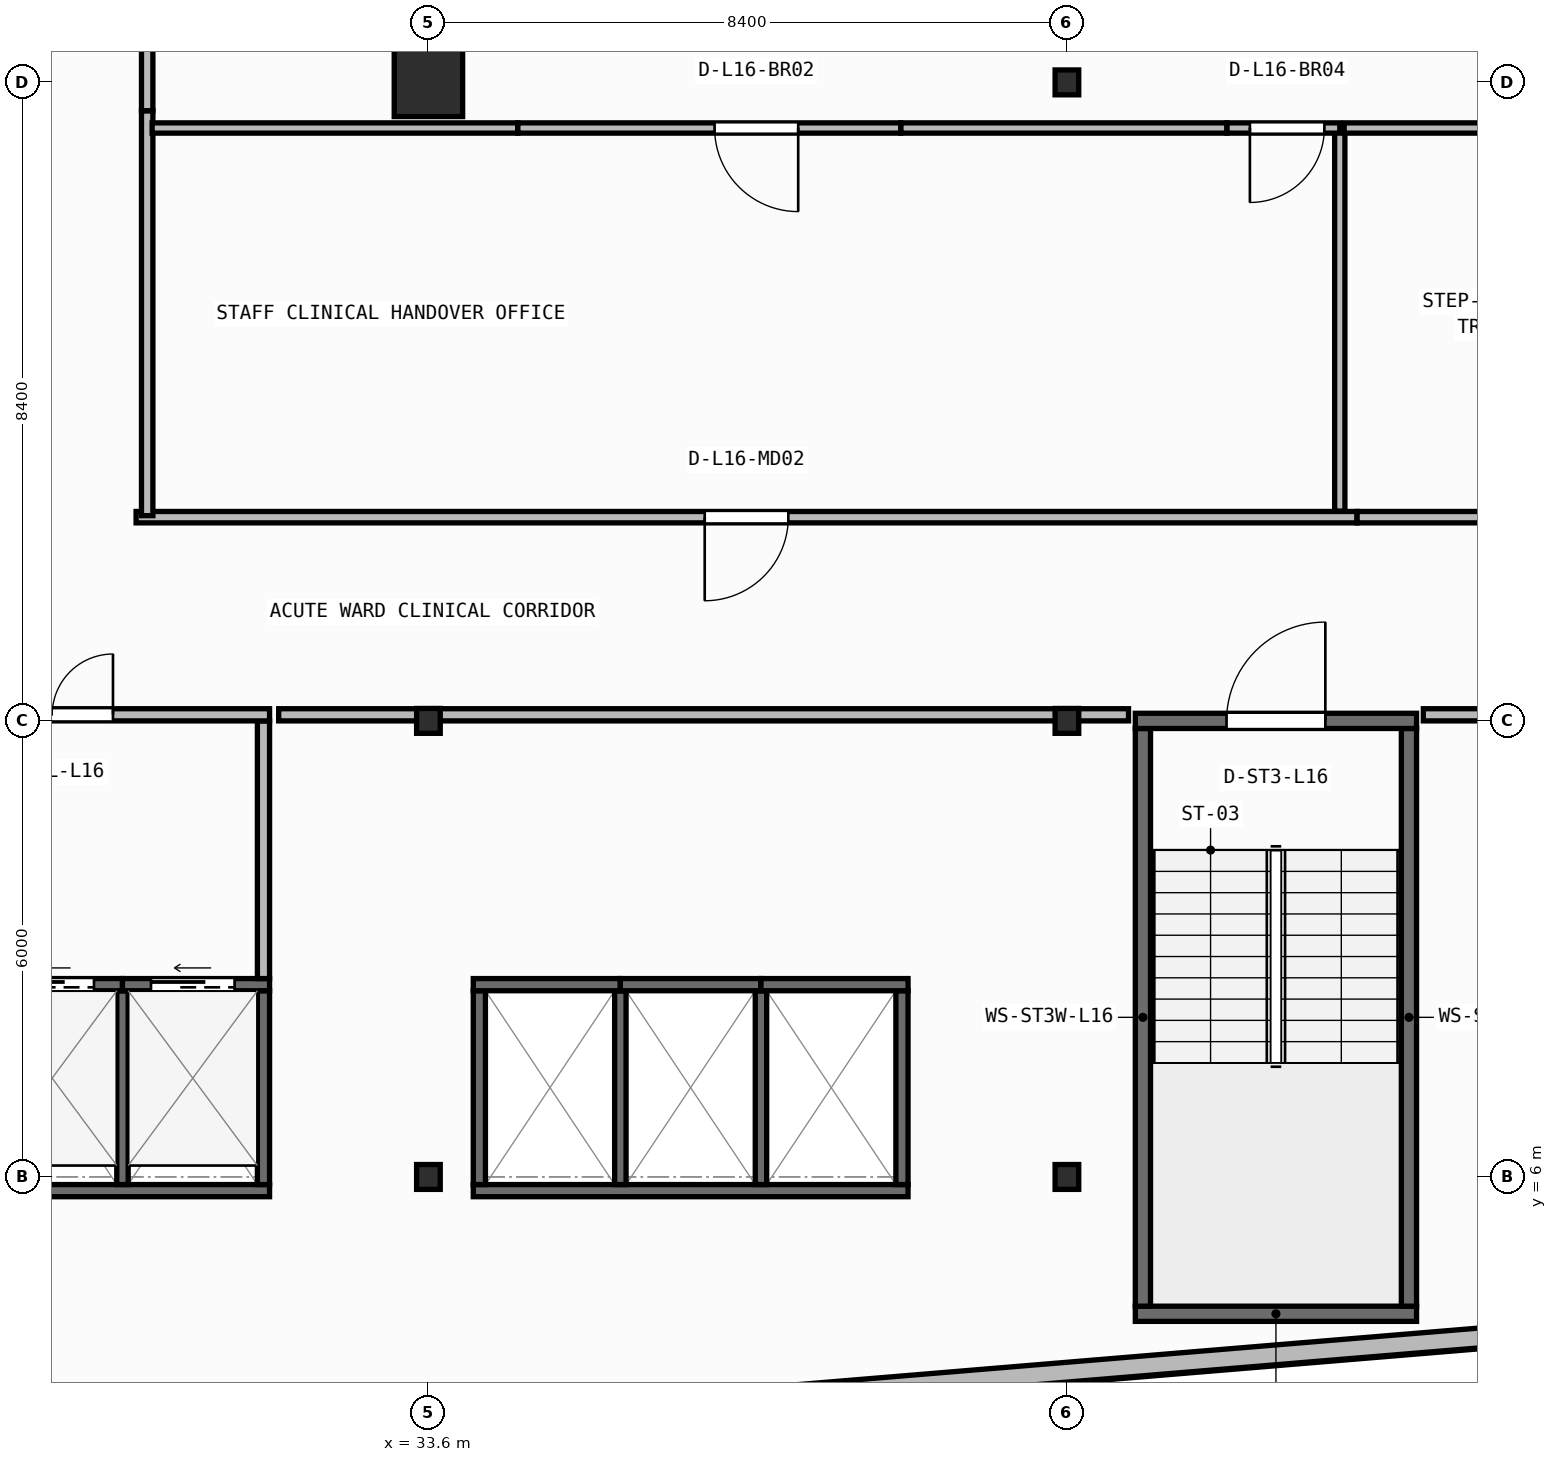
"""IFC4 building model, lengths in metres.
Left out: names, types, materials, properties, quantities, classifications, styles, units other than length and angle.
Written with IfcOpenShell. Run it as: python <this file> out.ifc"""

import sys

from ifc_helpers import new_model, si_unit, direction, frame, frame_2d, origin, origin_2d, place, context, subcontext, project, spatial, rectangle, i_section, extrude, element, fill, save


model = new_model("IFC4")
c1 = context("Model", 3, precision=1e-05, world=origin(), true_north=direction((0.0, 1.0)))
c2 = subcontext(c1, "Body", "Model", "MODEL_VIEW")
j1 = project(units=[si_unit("LENGTHUNIT", "METRE"), si_unit("PLANEANGLEUNIT", "RADIAN")], contexts=[c1])
p1 = place(None, origin())
s1 = spatial("IfcSite", under=j1, at=p1, CompositionType="ELEMENT")
p2 = place(p1, origin())
s2 = spatial("IfcBuilding", under=s1, at=p2, CompositionType="ELEMENT")
p3 = place(p2, frame((0.0, 0.0, 65.95)))
s3 = spatial("IfcBuildingStorey", under=s2, at=p3, CompositionType="ELEMENT", Elevation=65.95)
for number, where, z_axis, x_axis in (
    (1, (33.6, 6.0, 0.0), (0.0, 0.0, 1.0), (1.0, 0.0, 0.0)),
    (2, (42.0, 6.0, 0.0), (0.0, 0.0, 1.0), (1.0, 0.0, 0.0)),
    (3, (33.6, 12.0, 0.0), (0.0, 0.0, 1.0), (1.0, 0.0, 0.0)),
    (4, (42.0, 12.0, 0.0), (0.0, 0.0, 1.0), (1.0, 0.0, 0.0)),
):
    element("IfcColumn", number, at=place(p3, frame(where, z_axis=z_axis, x_axis=x_axis)), inside=s3, PredefinedType="COLUMN", context=c2, shape_type="SweptSolid", body=[
        extrude(i_section(OverallWidth=0.311, OverallDepth=0.327, WebThickness=0.016, FlangeThickness=0.025, FilletRadius=0.017, at=origin_2d()), origin(), (0.0, 0.0, 1.0), 3.95),
    ])
p4 = place(p3, frame((33.6, 20.4, 0.0), z_axis=(0.0, 0.0, 1.0), x_axis=(1.0, 0.0, 0.0)))
e5 = element("IfcColumn", 5, at=p4, inside=s3, PredefinedType="COLUMN", context=c2, shape_type="SweptSolid", body=[
    extrude(rectangle(XDim=0.9, YDim=0.9, at=origin_2d()), origin(), (0.0, 0.0, 1.0), 3.95),
])
p5 = place(p3, frame((42.0, 20.4, 0.0), z_axis=(0.0, 0.0, 1.0), x_axis=(1.0, 0.0, 0.0)))
e6 = element("IfcColumn", 6, at=p5, inside=s3, PredefinedType="COLUMN", context=c2, shape_type="SweptSolid", body=[
    extrude(i_section(OverallWidth=0.311, OverallDepth=0.327, WebThickness=0.016, FlangeThickness=0.025, FilletRadius=0.017, at=origin_2d()), origin(), (0.0, 0.0, 1.0), 3.95),
])
p6 = place(p3, frame((2.76, 0.174, 0.0), z_axis=(0.0, 0.0, 1.0), x_axis=(0.996571478456, 0.082736257641, 0.0)))
e7 = element("IfcWall", 7, at=p6, inside=s3, PredefinedType="STANDARD", context=c2, shape_type="SweptSolid", body=[
    extrude(rectangle(XDim=52.861, YDim=0.26, at=frame_2d((26.431, 0.0))), origin(), (0.0, 0.0, 1.0), 3.71),
])
p7 = place(p6, frame((25.231, 0.0, 0.9)))
e8 = element("IfcOpeningElement", 8, at=p7, cuts=e7, PredefinedType="OPENING", context=c2, shape_type="SweptSolid", body=[
    extrude(rectangle(XDim=2.4, YDim=1.65, at=frame_2d((1.2, 0.825))), frame((0.0, 0.14, 0.0), z_axis=(0.0, -1.0, 0.0), x_axis=(1.0, 0.0, 0.0)), (0.0, 0.0, 1.0), 0.28),
])
p8 = place(p3, frame((42.9, 4.2, 0.0), z_axis=(0.0, 0.0, 1.0), x_axis=(1.0, 0.0, 0.0)))
e9 = element("IfcWall", 9, at=p8, inside=s3, PredefinedType="SHEAR", context=c2, shape_type="SweptSolid", body=[
    extrude(rectangle(XDim=3.7, YDim=0.2, at=frame_2d((1.85, 0.0))), origin(), (0.0, 0.0, 1.0), 3.71),
])
for number, where, z_axis, x_axis in (
    (10, (43.0, 4.3, 0.0), (0.0, 0.0, 1.0), (0.0, 1.0, 0.0)),
    (11, (46.5, 4.3, 0.0), (0.0, 0.0, 1.0), (0.0, 1.0, 0.0)),
):
    element("IfcWall", number, at=place(p3, frame(where, z_axis=z_axis, x_axis=x_axis)), inside=s3, PredefinedType="SHEAR", context=c2, shape_type="SweptSolid", body=[
        extrude(rectangle(XDim=7.6, YDim=0.2, at=frame_2d((3.8, 0.0))), origin(), (0.0, 0.0, 1.0), 3.71),
    ])
p9 = place(p3, frame((42.9, 12.0, 0.0), z_axis=(0.0, 0.0, 1.0), x_axis=(1.0, 0.0, 0.0)))
e12 = element("IfcWall", 12, at=p9, inside=s3, PredefinedType="SHEAR", context=c2, shape_type="SweptSolid", body=[
    extrude(rectangle(XDim=3.7, YDim=0.2, at=frame_2d((1.85, 0.0))), origin(), (0.0, 0.0, 1.0), 3.71),
])
p10 = place(p9, frame((1.2, 0.0, 0.0)))
e13 = element("IfcOpeningElement", 13, at=p10, cuts=e12, PredefinedType="OPENING", context=c2, shape_type="SweptSolid", body=[
    extrude(rectangle(XDim=1.3, YDim=2.15, at=frame_2d((0.65, 1.075))), frame((0.0, 0.11, 0.0), z_axis=(0.0, -1.0, 0.0), x_axis=(1.0, 0.0, 0.0)), (0.0, 0.0, 1.0), 0.22),
])
p11 = place(p3, frame((25.79, 5.82, 0.0), z_axis=(0.0, 0.0, 1.0), x_axis=(1.0, 0.0, 0.0)))
e14 = element("IfcWall", 14, at=p11, inside=s3, PredefinedType="SHEAR", context=c2, shape_type="SweptSolid", body=[
    extrude(rectangle(XDim=5.72, YDim=0.16, at=frame_2d((2.86, 0.0))), origin(), (0.0, 0.0, 1.0), 3.71),
])
p12 = place(p3, frame((31.43, 5.9, 0.0), z_axis=(0.0, 0.0, 1.0), x_axis=(0.0, 1.0, 0.0)))
e15 = element("IfcWall", 15, at=p12, inside=s3, PredefinedType="SHEAR", context=c2, shape_type="SweptSolid", body=[
    extrude(rectangle(XDim=2.55, YDim=0.16, at=frame_2d((1.275, 0.0))), origin(), (0.0, 0.0, 1.0), 3.71),
])
p13 = place(p3, frame((29.575, 5.9, 0.0), z_axis=(0.0, 0.0, 1.0), x_axis=(0.0, 1.0, 0.0)))
e16 = element("IfcWall", 16, at=p13, inside=s3, PredefinedType="SHEAR", context=c2, shape_type="SweptSolid", body=[
    extrude(rectangle(XDim=2.55, YDim=0.15, at=frame_2d((1.275, 0.0))), origin(), (0.0, 0.0, 1.0), 3.71),
])
p14 = place(p3, frame((27.725, 8.53, 0.0), z_axis=(0.0, 0.0, 1.0), x_axis=(1.0, 0.0, 0.0)))
e17 = element("IfcWall", 17, at=p14, inside=s3, PredefinedType="SHEAR", context=c2, shape_type="SweptSolid", body=[
    extrude(rectangle(XDim=1.85, YDim=0.16, at=frame_2d((0.925, 0.0))), origin(), (0.0, 0.0, 1.0), 3.71),
])
p15 = place(p14, frame((0.375, 0.0, 0.0)))
e18 = element("IfcOpeningElement", 18, at=p15, cuts=e17, PredefinedType="OPENING", context=c2, shape_type="SweptSolid", body=[
    extrude(rectangle(XDim=1.1, YDim=2.15, at=frame_2d((0.55, 1.075))), frame((0.0, 0.09, 0.0), z_axis=(0.0, -1.0, 0.0), x_axis=(1.0, 0.0, 0.0)), (0.0, 0.0, 1.0), 0.18),
])
p16 = place(p3, frame((29.575, 8.53, 0.0), z_axis=(0.0, 0.0, 1.0), x_axis=(1.0, 0.0, 0.0)))
e19 = element("IfcWall", 19, at=p16, inside=s3, PredefinedType="SHEAR", context=c2, shape_type="SweptSolid", body=[
    extrude(rectangle(XDim=1.935, YDim=0.16, at=frame_2d((0.968, 0.0))), origin(), (0.0, 0.0, 1.0), 3.71),
])
p17 = place(p16, frame((0.375, 0.0, 0.0)))
e20 = element("IfcOpeningElement", 20, at=p17, cuts=e19, PredefinedType="OPENING", context=c2, shape_type="SweptSolid", body=[
    extrude(rectangle(XDim=1.1, YDim=2.15, at=frame_2d((0.55, 1.075))), frame((0.0, 0.09, 0.0), z_axis=(0.0, -1.0, 0.0), x_axis=(1.0, 0.0, 0.0)), (0.0, 0.0, 1.0), 0.18),
])
p18 = place(p3, frame((34.19, 5.82, 0.0), z_axis=(0.0, 0.0, 1.0), x_axis=(1.0, 0.0, 0.0)))
e21 = element("IfcWall", 21, at=p18, inside=s3, PredefinedType="SHEAR", context=c2, shape_type="SweptSolid", body=[
    extrude(rectangle(XDim=5.72, YDim=0.16, at=frame_2d((2.86, 0.0))), origin(), (0.0, 0.0, 1.0), 3.71),
])
for number, where, z_axis, x_axis in (
    (22, (34.27, 5.9, 0.0), (0.0, 0.0, 1.0), (0.0, 1.0, 0.0)),
    (23, (39.83, 5.9, 0.0), (0.0, 0.0, 1.0), (0.0, 1.0, 0.0)),
):
    element("IfcWall", number, at=place(p3, frame(where, z_axis=z_axis, x_axis=x_axis)), inside=s3, PredefinedType="SHEAR", context=c2, shape_type="SweptSolid", body=[
        extrude(rectangle(XDim=2.55, YDim=0.16, at=frame_2d((1.275, 0.0))), origin(), (0.0, 0.0, 1.0), 3.71),
    ])
for number, where, z_axis, x_axis in (
    (24, (36.125, 5.9, 0.0), (0.0, 0.0, 1.0), (0.0, 1.0, 0.0)),
    (25, (37.975, 5.9, 0.0), (0.0, 0.0, 1.0), (0.0, 1.0, 0.0)),
):
    element("IfcWall", number, at=place(p3, frame(where, z_axis=z_axis, x_axis=x_axis)), inside=s3, PredefinedType="SHEAR", context=c2, shape_type="SweptSolid", body=[
        extrude(rectangle(XDim=2.55, YDim=0.15, at=frame_2d((1.275, 0.0))), origin(), (0.0, 0.0, 1.0), 3.71),
    ])
p19 = place(p3, frame((34.19, 8.53, 0.0), z_axis=(0.0, 0.0, 1.0), x_axis=(1.0, 0.0, 0.0)))
e26 = element("IfcWall", 26, at=p19, inside=s3, PredefinedType="SHEAR", context=c2, shape_type="SweptSolid", body=[
    extrude(rectangle(XDim=1.935, YDim=0.16, at=frame_2d((0.968, 0.0))), origin(), (0.0, 0.0, 1.0), 3.71),
])
p20 = place(p3, frame((36.125, 8.53, 0.0), z_axis=(0.0, 0.0, 1.0), x_axis=(1.0, 0.0, 0.0)))
e27 = element("IfcWall", 27, at=p20, inside=s3, PredefinedType="SHEAR", context=c2, shape_type="SweptSolid", body=[
    extrude(rectangle(XDim=1.85, YDim=0.16, at=frame_2d((0.925, 0.0))), origin(), (0.0, 0.0, 1.0), 3.71),
])
p21 = place(p3, frame((37.975, 8.53, 0.0), z_axis=(0.0, 0.0, 1.0), x_axis=(1.0, 0.0, 0.0)))
e28 = element("IfcWall", 28, at=p21, inside=s3, PredefinedType="SHEAR", context=c2, shape_type="SweptSolid", body=[
    extrude(rectangle(XDim=1.935, YDim=0.16, at=frame_2d((0.967, 0.0))), origin(), (0.0, 0.0, 1.0), 3.71),
])
p22 = place(p3, frame((31.43, 8.61, 0.0), z_axis=(0.0, 0.0, 1.0), x_axis=(0.0, 1.0, 0.0)))
e29 = element("IfcWall", 29, at=p22, inside=s3, PredefinedType="PARTITIONING", context=c2, shape_type="SweptSolid", body=[
    extrude(rectangle(XDim=3.39, YDim=0.16, at=frame_2d((1.695, 0.0))), origin(), (0.0, 0.0, 1.0), 3.71),
])
p23 = place(p3, frame((25.79, 12.08, 0.0), z_axis=(0.0, 0.0, 1.0), x_axis=(1.0, 0.0, 0.0)))
e30 = element("IfcWall", 30, at=p23, inside=s3, PredefinedType="PARTITIONING", context=c2, shape_type="SweptSolid", body=[
    extrude(rectangle(XDim=5.72, YDim=0.16, at=frame_2d((2.86, 0.0))), origin(), (0.0, 0.0, 1.0), 3.073),
])
p24 = place(p23, frame((2.06, 0.0, 0.0)))
e31 = element("IfcOpeningElement", 31, at=p24, cuts=e30, PredefinedType="OPENING", context=c2, shape_type="SweptSolid", body=[
    extrude(rectangle(XDim=1.6, YDim=2.05, at=frame_2d((0.8, 1.025))), frame((0.0, 0.09, 0.0), z_axis=(0.0, -1.0, 0.0), x_axis=(1.0, 0.0, 0.0)), (0.0, 0.0, 1.0), 0.18),
])
p25 = place(p3, frame((45.816, 14.68, 0.0), z_axis=(0.0, 0.0, 1.0), x_axis=(-1.0, 0.0, 0.0)))
e32 = element("IfcWall", 32, at=p25, inside=s3, PredefinedType="PARTITIONING", context=c2, shape_type="SweptSolid", body=[
    extrude(rectangle(XDim=16.062, YDim=0.15, at=frame_2d((8.031, 0.0))), origin(), (0.0, 0.0, 1.0), 3.71),
])
p26 = place(p25, frame((7.481, 0.0, 0.0)))
e33 = element("IfcOpeningElement", 33, at=p26, cuts=e32, PredefinedType="OPENING", context=c2, shape_type="SweptSolid", body=[
    extrude(rectangle(XDim=1.1, YDim=2.1, at=frame_2d((0.55, 1.05))), frame((0.0, 0.085, 0.0), z_axis=(0.0, -1.0, 0.0), x_axis=(1.0, 0.0, 0.0)), (0.0, 0.0, 1.0), 0.17),
])
p27 = place(p3, frame((58.04, 14.68, 0.0), z_axis=(0.0, 0.0, 1.0), x_axis=(-1.0, 0.0, 0.0)))
e34 = element("IfcWall", 34, at=p27, inside=s3, PredefinedType="PARTITIONING", context=c2, shape_type="SweptSolid", body=[
    extrude(rectangle(XDim=12.222, YDim=0.15, at=frame_2d((6.111, 0.0))), origin(), (0.0, 0.0, 1.0), 3.71),
])
p28 = place(p27, frame((5.561, 0.0, 0.0)))
e35 = element("IfcOpeningElement", 35, at=p28, cuts=e34, PredefinedType="OPENING", context=c2, shape_type="SweptSolid", body=[
    extrude(rectangle(XDim=1.1, YDim=2.1, at=frame_2d((0.55, 1.05))), frame((0.0, 0.085, 0.0), z_axis=(0.0, -1.0, 0.0), x_axis=(1.0, 0.0, 0.0)), (0.0, 0.0, 1.0), 0.17),
])
p29 = place(p3, frame((29.9, 14.7, 0.0), z_axis=(0.0, 0.0, 1.0), x_axis=(0.0, 1.0, 0.0)))
e36 = element("IfcWall", 36, at=p29, inside=s3, PredefinedType="PARTITIONING", context=c2, shape_type="SweptSolid", body=[
    extrude(rectangle(XDim=5.326, YDim=0.15, at=frame_2d((2.663, 0.0))), origin(), (0.0, 0.0, 1.0), 3.71),
])
p30 = place(p3, frame((29.9, 20.028, 0.0), z_axis=(0.0, 0.0, 1.0), x_axis=(0.0, 1.0, 0.0)))
e37 = element("IfcWall", 37, at=p30, inside=s3, PredefinedType="PARTITIONING", context=c2, shape_type="SweptSolid", body=[
    extrude(rectangle(XDim=4.518, YDim=0.15, at=frame_2d((2.259, 0.0))), origin(), (0.0, 0.0, 1.0), 3.71),
])
p31 = place(p30, frame((1.709, 0.0, 0.0)))
e38 = element("IfcOpeningElement", 38, at=p31, cuts=e37, PredefinedType="OPENING", context=c2, shape_type="SweptSolid", body=[
    extrude(rectangle(XDim=1.1, YDim=2.1, at=frame_2d((0.55, 1.05))), frame((0.0, 0.085, 0.0), z_axis=(0.0, -1.0, 0.0), x_axis=(1.0, 0.0, 0.0)), (0.0, 0.0, 1.0), 0.17),
])
p32 = place(p3, frame((45.59, 14.76, 0.0), z_axis=(0.0, 0.0, 1.0), x_axis=(0.0, 1.0, 0.0)))
e39 = element("IfcWall", 39, at=p32, inside=s3, PredefinedType="PARTITIONING", context=c2, shape_type="SweptSolid", body=[
    extrude(rectangle(XDim=5.04, YDim=0.135, at=frame_2d((2.52, 0.0))), origin(), (0.0, 0.0, 1.0), 3.71),
])
p33 = place(p3, frame((34.775, 19.8, 0.0), z_axis=(0.0, 0.0, 1.0), x_axis=(-1.0, 0.0, 0.0)))
e40 = element("IfcWall", 40, at=p33, inside=s3, PredefinedType="PARTITIONING", context=c2, shape_type="SweptSolid", body=[
    extrude(rectangle(XDim=4.81, YDim=0.135, at=frame_2d((2.405, 0.0))), origin(), (0.0, 0.0, 1.0), 3.71),
])
p34 = place(p3, frame((39.815, 19.8, 0.0), z_axis=(0.0, 0.0, 1.0), x_axis=(-1.0, 0.0, 0.0)))
e41 = element("IfcWall", 41, at=p34, inside=s3, PredefinedType="PARTITIONING", context=c2, shape_type="SweptSolid", body=[
    extrude(rectangle(XDim=5.038, YDim=0.135, at=frame_2d((2.519, 0.0))), origin(), (0.0, 0.0, 1.0), 3.71),
])
p35 = place(p34, frame((1.35, 0.0, 0.0)))
e42 = element("IfcOpeningElement", 42, at=p35, cuts=e41, PredefinedType="OPENING", context=c2, shape_type="SweptSolid", body=[
    extrude(rectangle(XDim=1.1, YDim=2.1, at=frame_2d((0.55, 1.05))), frame((0.0, 0.077, 0.0), z_axis=(0.0, -1.0, 0.0), x_axis=(1.0, 0.0, 0.0)), (0.0, 0.0, 1.0), 0.155),
])
p36 = place(p3, frame((44.104, 19.8, 0.0), z_axis=(0.0, 0.0, 1.0), x_axis=(-1.0, 0.0, 0.0)))
e43 = element("IfcWall", 43, at=p36, inside=s3, PredefinedType="PARTITIONING", context=c2, shape_type="SweptSolid", body=[
    extrude(rectangle(XDim=4.288, YDim=0.135, at=frame_2d((2.144, 0.0))), origin(), (0.0, 0.0, 1.0), 3.71),
])
p37 = place(p3, frame((45.59, 19.8, 0.0), z_axis=(0.0, 0.0, 1.0), x_axis=(-1.0, 0.0, 0.0)))
e44 = element("IfcWall", 44, at=p37, inside=s3, PredefinedType="PARTITIONING", context=c2, shape_type="SweptSolid", body=[
    extrude(rectangle(XDim=1.483, YDim=0.135, at=frame_2d((0.742, 0.0))), origin(), (0.0, 0.0, 1.0), 3.71),
])
p38 = place(p37, frame((0.203, 0.0, 0.0)))
e45 = element("IfcOpeningElement", 45, at=p38, cuts=e44, PredefinedType="OPENING", context=c2, shape_type="SweptSolid", body=[
    extrude(rectangle(XDim=0.98, YDim=2.1, at=frame_2d((0.49, 1.05))), frame((0.0, 0.077, 0.0), z_axis=(0.0, -1.0, 0.0), x_axis=(1.0, 0.0, 0.0)), (0.0, 0.0, 1.0), 0.155),
])
p39 = place(p3, frame((48.765, 19.8, 0.0), z_axis=(0.0, 0.0, 1.0), x_axis=(-1.0, 0.0, 0.0)))
e46 = element("IfcWall", 46, at=p39, inside=s3, PredefinedType="PARTITIONING", context=c2, shape_type="SweptSolid", body=[
    extrude(rectangle(XDim=3.117, YDim=0.135, at=frame_2d((1.559, 0.0))), origin(), (0.0, 0.0, 1.0), 3.71),
])
p40 = place(p3, frame((31.63, 12.08, 0.0), z_axis=(0.0, 0.0, 1.0), x_axis=(1.0, 0.0, 0.0)))
e47 = element("IfcWall", 47, at=p40, inside=s3, PredefinedType="PARTITIONING", context=c2, shape_type="SweptSolid", body=[
    extrude(rectangle(XDim=11.181, YDim=0.16, at=frame_2d((5.59, 0.0))), origin(), (0.0, 0.0, 1.0), 3.073),
])
p41 = place(p3, frame((46.689, 12.08, 0.0), z_axis=(0.0, 0.0, 1.0), x_axis=(1.0, 0.0, 0.0)))
e48 = element("IfcWall", 48, at=p41, inside=s3, PredefinedType="PARTITIONING", context=c2, shape_type="SweptSolid", body=[
    extrude(rectangle(XDim=3.011, YDim=0.16, at=frame_2d((1.505, 0.0))), origin(), (0.0, 0.0, 1.0), 3.073),
])
p42 = place(p10, origin())
e49 = element("IfcDoor", 49, at=p42, inside=s3, OperationType="SINGLE_SWING_RIGHT", PredefinedType="DOOR", context=c2, shape_type="SweptSolid", body=[
    extrude(rectangle(XDim=1.3, YDim=2.15, at=frame_2d((0.65, 1.075))), frame((0.0, 0.025, 0.0), z_axis=(0.0, -1.0, 0.0), x_axis=(1.0, 0.0, 0.0)), (0.0, 0.0, 1.0), 0.05),
])
fill(e13, e49)
p43 = place(p15, origin())
e50 = element("IfcDoor", 50, at=p43, inside=s3, OperationType="SLIDING_TO_LEFT", PredefinedType="DOOR", context=c2, shape_type="SweptSolid", body=[
    extrude(rectangle(XDim=1.1, YDim=2.15, at=frame_2d((0.55, 1.075))), frame((0.0, 0.025, 0.0), z_axis=(0.0, -1.0, 0.0), x_axis=(1.0, 0.0, 0.0)), (0.0, 0.0, 1.0), 0.05),
])
fill(e18, e50)
p44 = place(p17, origin())
e51 = element("IfcDoor", 51, at=p44, inside=s3, OperationType="SLIDING_TO_LEFT", PredefinedType="DOOR", context=c2, shape_type="SweptSolid", body=[
    extrude(rectangle(XDim=1.1, YDim=2.15, at=frame_2d((0.55, 1.075))), frame((0.0, 0.025, 0.0), z_axis=(0.0, -1.0, 0.0), x_axis=(1.0, 0.0, 0.0)), (0.0, 0.0, 1.0), 0.05),
])
fill(e20, e51)
p45 = place(p24, origin())
e52 = element("IfcDoor", 52, at=p45, inside=s3, OperationType="DOUBLE_DOOR_SINGLE_SWING", PredefinedType="DOOR", context=c2, shape_type="SweptSolid", body=[
    extrude(rectangle(XDim=1.6, YDim=2.05, at=frame_2d((0.8, 1.025))), frame((0.0, 0.025, 0.0), z_axis=(0.0, -1.0, 0.0), x_axis=(1.0, 0.0, 0.0)), (0.0, 0.0, 1.0), 0.05),
])
fill(e31, e52)
p46 = place(p26, origin())
e53 = element("IfcDoor", 53, at=p46, inside=s3, OperationType="SINGLE_SWING_RIGHT", PredefinedType="DOOR", context=c2, shape_type="SweptSolid", body=[
    extrude(rectangle(XDim=1.1, YDim=2.1, at=frame_2d((0.55, 1.05))), frame((0.0, 0.025, 0.0), z_axis=(0.0, -1.0, 0.0), x_axis=(1.0, 0.0, 0.0)), (0.0, 0.0, 1.0), 0.05),
])
fill(e33, e53)
p47 = place(p35, origin())
e54 = element("IfcDoor", 54, at=p47, inside=s3, OperationType="SINGLE_SWING_LEFT", PredefinedType="DOOR", context=c2, shape_type="SweptSolid", body=[
    extrude(rectangle(XDim=1.1, YDim=2.1, at=frame_2d((0.55, 1.05))), frame((0.0, 0.025, 0.0), z_axis=(0.0, -1.0, 0.0), x_axis=(1.0, 0.0, 0.0)), (0.0, 0.0, 1.0), 0.05),
])
fill(e42, e54)
p48 = place(p38, origin())
e55 = element("IfcDoor", 55, at=p48, inside=s3, OperationType="SINGLE_SWING_RIGHT", PredefinedType="DOOR", context=c2, shape_type="SweptSolid", body=[
    extrude(rectangle(XDim=0.98, YDim=2.1, at=frame_2d((0.49, 1.05))), frame((0.0, 0.025, 0.0), z_axis=(0.0, -1.0, 0.0), x_axis=(1.0, 0.0, 0.0)), (0.0, 0.0, 1.0), 0.05),
])
fill(e45, e55)
save(model, sys.argv[1])
